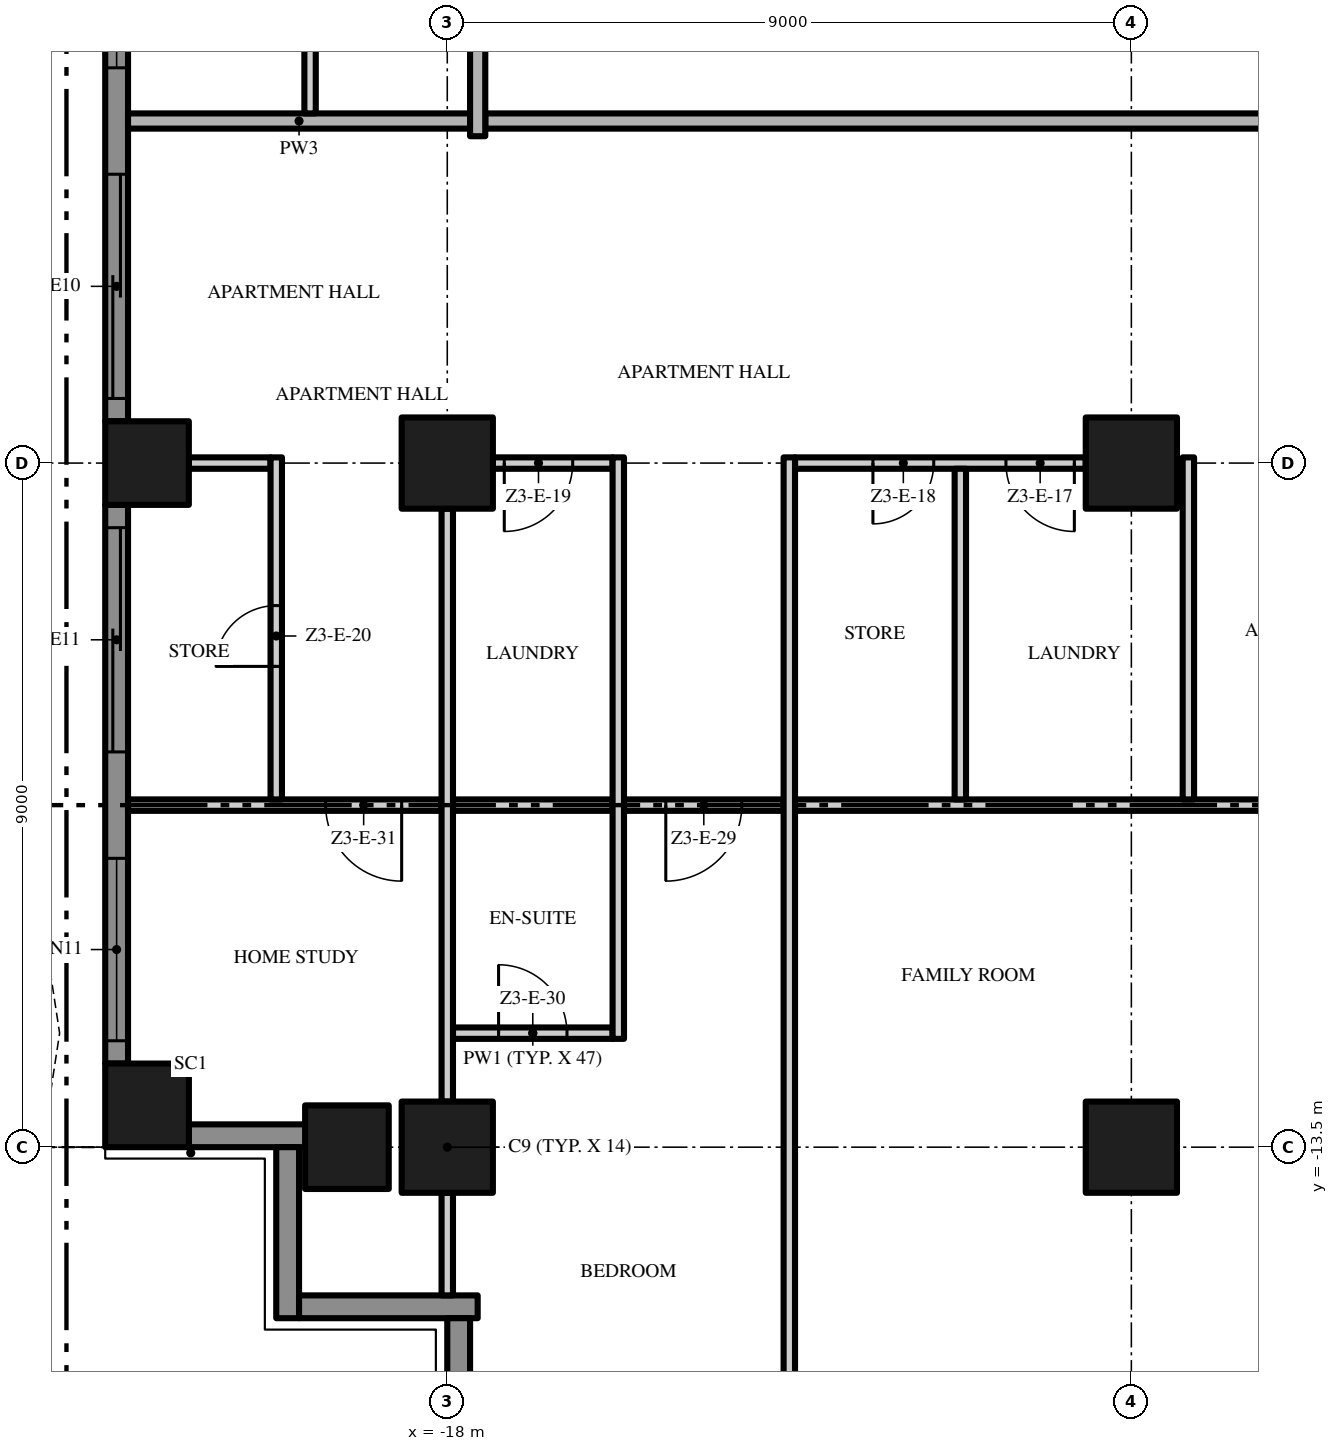
"""IFC4 building model, lengths in metres.
Left out: names, types, materials, properties, quantities, classifications, styles, units other than length and angle.
Written with IfcOpenShell. Run it as: python <this file> out.ifc"""

import sys

from ifc_helpers import new_model, si_unit, direction, frame, frame_2d, origin, origin_2d, place, context, subcontext, project, spatial, polyline, rectangle, outline, extrude, element, fill, save


model = new_model("IFC4")
c1 = context("Model", 3, precision=1e-05, world=origin(), true_north=direction((0.0, 1.0)))
c2 = subcontext(c1, "Body", "Model", "MODEL_VIEW")
j1 = project(units=[si_unit("LENGTHUNIT", "METRE"), si_unit("PLANEANGLEUNIT", "RADIAN")], contexts=[c1])
p1 = place(None, origin())
s1 = spatial("IfcSite", under=j1, at=p1, CompositionType="ELEMENT")
p2 = place(p1, origin())
s2 = spatial("IfcBuilding", under=s1, at=p2, CompositionType="ELEMENT")
p3 = place(p2, frame((0.0, 0.0, 166.8)))
s3 = spatial("IfcBuildingStorey", under=s2, at=p3, CompositionType="ELEMENT", Elevation=166.8)
for number, where, z_axis, x_axis in (
    (1, (-18.0, -13.5, 0.0), (0.0, 0.0, 1.0), (1.0, 0.0, 0.0)),
    (2, (-18.0, -4.5, 0.0), (0.0, 0.0, 1.0), (1.0, 0.0, 0.0)),
):
    element("IfcColumn", number, at=place(p3, frame(where, z_axis=z_axis, x_axis=x_axis)), inside=s3, PredefinedType="COLUMN", context=c2, shape_type="SweptSolid", body=[
        extrude(rectangle(XDim=1.2, YDim=1.2, at=origin_2d()), origin(), (0.0, 0.0, 1.0), 3.5),
    ])
for number, where, z_axis, x_axis in (
    (3, (-21.95, -12.95, 0.0), (0.0, 0.0, 1.0), (1.0, 0.0, 0.0)),
    (4, (-19.32, -13.5, 0.0), (0.0, 0.0, 1.0), (1.0, 0.0, 0.0)),
    (5, (-21.95, -4.5, 0.0), (0.0, 0.0, 1.0), (1.0, 0.0, 0.0)),
):
    element("IfcColumn", number, at=place(p3, frame(where, z_axis=z_axis, x_axis=x_axis)), inside=s3, PredefinedType="COLUMN", context=c2, shape_type="SweptSolid", body=[
        extrude(rectangle(XDim=1.1, YDim=1.1, at=origin_2d()), origin(), (0.0, 0.0, 1.0), 3.5),
    ])
for number, where, z_axis, x_axis in (
    (6, (-9.0, -13.5, 0.0), (0.0, 0.0, 1.0), (1.0, 0.0, 0.0)),
    (7, (-9.0, -4.5, 0.0), (0.0, 0.0, 1.0), (1.0, 0.0, 0.0)),
):
    element("IfcColumn", number, at=place(p3, frame(where, z_axis=z_axis, x_axis=x_axis)), inside=s3, PredefinedType="COLUMN", context=c2, shape_type="SweptSolid", body=[
        extrude(rectangle(XDim=1.2, YDim=1.2, at=origin_2d()), origin(), (0.0, 0.0, 1.0), 3.5),
    ])
p4 = place(p3, frame((-22.35, -3.95, 0.0), z_axis=(0.0, 0.0, 1.0), x_axis=(0.0, 1.0, 0.0)))
e8 = element("IfcWall", 8, at=p4, inside=s3, PredefinedType="SOLIDWALL", context=c2, shape_type="SweptSolid", body=[
    extrude(rectangle(XDim=7.9, YDim=0.3, at=frame_2d((3.95, 0.0))), origin(), (0.0, 0.0, 1.0), 3.5),
])
p5 = place(p4, frame((4.65, 0.0, 0.45)))
e9 = element("IfcOpeningElement", 9, at=p5, cuts=e8, PredefinedType="OPENING", context=c2, shape_type="SweptSolid", body=[
    extrude(rectangle(XDim=2.95, YDim=2.65, at=frame_2d((1.475, 1.325))), frame((0.0, 0.16, 0.0), z_axis=(0.0, -1.0, 0.0), x_axis=(1.0, 0.0, 0.0)), (0.0, 0.0, 1.0), 0.32),
])
p6 = place(p4, frame((0.3, 0.0, 0.0)))
e10 = element("IfcOpeningElement", 10, at=p6, cuts=e8, PredefinedType="OPENING", context=c2, shape_type="SweptSolid", body=[
    extrude(rectangle(XDim=2.95, YDim=2.4, at=frame_2d((1.475, 1.2))), frame((0.0, 0.16, 0.0), z_axis=(0.0, -1.0, 0.0), x_axis=(1.0, 0.0, 0.0)), (0.0, 0.0, 1.0), 0.32),
])
p7 = place(p3, frame((-22.35, -12.4, 0.0), z_axis=(0.0, 0.0, 1.0), x_axis=(0.0, 1.0, 0.0)))
e11 = element("IfcWall", 11, at=p7, inside=s3, PredefinedType="SOLIDWALL", context=c2, shape_type="SweptSolid", body=[
    extrude(rectangle(XDim=7.35, YDim=0.3, at=frame_2d((3.675, 0.0))), origin(), (0.0, 0.0, 1.0), 3.5),
])
p8 = place(p7, frame((4.1, 0.0, 0.0)))
e12 = element("IfcOpeningElement", 12, at=p8, cuts=e11, PredefinedType="OPENING", context=c2, shape_type="SweptSolid", body=[
    extrude(rectangle(XDim=2.95, YDim=2.4, at=frame_2d((1.475, 1.2))), frame((0.0, 0.16, 0.0), z_axis=(0.0, -1.0, 0.0), x_axis=(1.0, 0.0, 0.0)), (0.0, 0.0, 1.0), 0.32),
])
p9 = place(p7, frame((0.3, 0.0, 0.45)))
e13 = element("IfcOpeningElement", 13, at=p9, cuts=e11, PredefinedType="OPENING", context=c2, shape_type="SweptSolid", body=[
    extrude(rectangle(XDim=2.4, YDim=2.65, at=frame_2d((1.2, 1.325))), frame((0.0, 0.16, 0.0), z_axis=(0.0, -1.0, 0.0), x_axis=(1.0, 0.0, 0.0)), (0.0, 0.0, 1.0), 0.32),
])
p10 = place(p3, frame((-19.85, -13.35, 0.0), z_axis=(0.0, 0.0, 1.0), x_axis=(-1.0, 0.0, 0.0)))
e14 = element("IfcWall", 14, at=p10, inside=s3, PredefinedType="SOLIDWALL", context=c2, shape_type="SweptSolid", body=[
    extrude(rectangle(XDim=1.55, YDim=0.3, at=frame_2d((0.775, 0.0))), origin(), (0.0, 0.0, 1.0), 3.5),
])
p11 = place(p3, frame((-20.1, -15.75, 0.0), z_axis=(0.0, 0.0, 1.0), x_axis=(0.0, 1.0, 0.0)))
e15 = element("IfcWall", 15, at=p11, inside=s3, PredefinedType="SOLIDWALL", context=c2, shape_type="SweptSolid", body=[
    extrude(rectangle(XDim=2.25, YDim=0.3, at=frame_2d((1.125, 0.0))), origin(), (0.0, 0.0, 1.0), 3.5),
])
p12 = place(p3, frame((-17.6, -15.6, 0.0), z_axis=(0.0, 0.0, 1.0), x_axis=(-1.0, 0.0, 0.0)))
e16 = element("IfcWall", 16, at=p12, inside=s3, PredefinedType="SOLIDWALL", context=c2, shape_type="SweptSolid", body=[
    extrude(rectangle(XDim=2.35, YDim=0.3, at=frame_2d((1.175, 0.0))), origin(), (0.0, 0.0, 1.0), 3.5),
])
p13 = place(p3, frame((-17.85, -16.9, 0.0), z_axis=(0.0, 0.0, 1.0), x_axis=(0.0, 1.0, 0.0)))
e17 = element("IfcWall", 17, at=p13, inside=s3, PredefinedType="SOLIDWALL", context=c2, shape_type="SweptSolid", body=[
    extrude(rectangle(XDim=1.15, YDim=0.3, at=frame_2d((0.575, 0.0))), origin(), (0.0, 0.0, 1.0), 3.5),
])
p14 = place(p3, origin())
e18 = element("IfcWall", 18, at=p14, inside=s3, PredefinedType="USERDEFINED", context=c2, shape_type="SweptSolid", body=[
    extrude(outline(polyline([(-23.1, 18.0), (-23.329, 16.5), (-23.929, 15.0), (-24.671, 13.5), (-25.271, 12.0), (-25.5, 10.5), (-25.271, 9.0), (-24.671, 7.5), (-23.929, 6.0), (-23.329, 4.5), (-23.1, 3.0), (-23.329, 1.5), (-23.929, 0.0), (-24.671, -1.5), (-25.271, -3.0), (-25.5, -4.5), (-25.271, -6.0), (-24.671, -7.5), (-23.929, -9.0), (-23.329, -10.5), (-23.1, -12.0), (-23.329, -13.5), (-23.082, -13.538), (-22.847, -12.0), (-23.086, -10.434), (-23.701, -8.898), (-24.442, -7.398), (-25.028, -5.934), (-25.247, -4.5), (-25.028, -3.066), (-24.442, -1.602), (-23.701, -0.102), (-23.086, 1.434), (-22.847, 3.0), (-23.086, 4.566), (-23.701, 6.102), (-24.442, 7.602), (-25.028, 9.066), (-25.247, 10.5), (-25.028, 11.934), (-24.442, 13.398), (-23.701, 14.898), (-23.086, 16.434), (-22.853, 17.962), (-23.1, 18.0)])), origin(), (0.0, 0.0, 1.0), 0.9),
])
p15 = place(p3, frame((-17.925, -12.0, 0.0), z_axis=(0.0, 0.0, 1.0), x_axis=(1.0, 0.0, 0.0)))
e19 = element("IfcWall", 19, at=p15, inside=s3, PredefinedType="PARTITIONING", context=c2, shape_type="SweptSolid", body=[
    extrude(rectangle(XDim=2.1, YDim=0.15, at=frame_2d((1.05, 0.0))), origin(), (0.0, 0.0, 1.0), 3.5),
])
p16 = place(p15, frame((0.6, 0.0, 0.0)))
e20 = element("IfcOpeningElement", 20, at=p16, cuts=e19, PredefinedType="OPENING", context=c2, shape_type="SweptSolid", body=[
    extrude(rectangle(XDim=0.9, YDim=2.1, at=frame_2d((0.45, 1.05))), frame((0.0, 0.085, 0.0), z_axis=(0.0, -1.0, 0.0), x_axis=(1.0, 0.0, 0.0)), (0.0, 0.0, 1.0), 0.17),
])
p17 = place(p3, frame((-18.075, -9.0, 0.0), z_axis=(0.0, 0.0, 1.0), x_axis=(-1.0, 0.0, 0.0)))
e21 = element("IfcWall", 21, at=p17, inside=s3, PredefinedType="PARTITIONING", context=c2, shape_type="SweptSolid", body=[
    extrude(rectangle(XDim=4.125, YDim=0.15, at=frame_2d((2.062, 0.0))), origin(), (0.0, 0.0, 1.0), 3.5),
])
p18 = place(p17, frame((0.525, 0.0, 0.0)))
e22 = element("IfcOpeningElement", 22, at=p18, cuts=e21, PredefinedType="OPENING", context=c2, shape_type="SweptSolid", body=[
    extrude(rectangle(XDim=1.0, YDim=2.4, at=frame_2d((0.5, 1.2))), frame((0.0, 0.085, 0.0), z_axis=(0.0, -1.0, 0.0), x_axis=(1.0, 0.0, 0.0)), (0.0, 0.0, 1.0), 0.17),
])
p19 = place(p3, frame((-17.925, -9.0, 0.0), z_axis=(0.0, 0.0, 1.0), x_axis=(1.0, 0.0, 0.0)))
e23 = element("IfcWall", 23, at=p19, inside=s3, PredefinedType="PARTITIONING", context=c2, shape_type="SweptSolid", body=[
    extrude(rectangle(XDim=2.1, YDim=0.15, at=frame_2d((1.05, 0.0))), origin(), (0.0, 0.0, 1.0), 3.5),
])
p20 = place(p3, frame((-13.575, -9.0, 0.0), z_axis=(0.0, 0.0, 1.0), x_axis=(-1.0, 0.0, 0.0)))
e24 = element("IfcWall", 24, at=p20, inside=s3, PredefinedType="PARTITIONING", context=c2, shape_type="SweptSolid", body=[
    extrude(rectangle(XDim=2.1, YDim=0.15, at=frame_2d((1.05, 0.0))), origin(), (0.0, 0.0, 1.0), 3.5),
])
p21 = place(p20, frame((0.55, 0.0, 0.0)))
e25 = element("IfcOpeningElement", 25, at=p21, cuts=e24, PredefinedType="OPENING", context=c2, shape_type="SweptSolid", body=[
    extrude(rectangle(XDim=1.0, YDim=2.4, at=frame_2d((0.5, 1.2))), frame((0.0, 0.085, 0.0), z_axis=(0.0, -1.0, 0.0), x_axis=(1.0, 0.0, 0.0)), (0.0, 0.0, 1.0), 0.17),
])
p22 = place(p3, frame((-4.575, -9.0, 0.0), z_axis=(0.0, 0.0, 1.0), x_axis=(-1.0, 0.0, 0.0)))
e26 = element("IfcWall", 26, at=p22, inside=s3, PredefinedType="PARTITIONING", context=c2, shape_type="SweptSolid", body=[
    extrude(rectangle(XDim=8.85, YDim=0.15, at=frame_2d((4.425, 0.0))), origin(), (0.0, 0.0, 1.0), 3.5),
])
p23 = place(p22, frame((1.075, 0.0, 0.0)))
e27 = element("IfcOpeningElement", 27, at=p23, cuts=e26, PredefinedType="OPENING", context=c2, shape_type="SweptSolid", body=[
    extrude(rectangle(XDim=1.5, YDim=2.4, at=frame_2d((0.75, 1.2))), frame((0.0, 0.085, 0.0), z_axis=(0.0, -1.0, 0.0), x_axis=(1.0, 0.0, 0.0)), (0.0, 0.0, 1.0), 0.17),
])
p24 = place(p3, frame((-21.4, -4.5, 0.0), z_axis=(0.0, 0.0, 1.0), x_axis=(1.0, 0.0, 0.0)))
e28 = element("IfcWall", 28, at=p24, inside=s3, PredefinedType="PARTITIONING", context=c2, shape_type="SweptSolid", body=[
    extrude(rectangle(XDim=1.075, YDim=0.15, at=frame_2d((0.537, 0.0))), origin(), (0.0, 0.0, 1.0), 3.5),
])
p25 = place(p3, frame((-15.825, -4.5, 0.0), z_axis=(0.0, 0.0, 1.0), x_axis=(-1.0, 0.0, 0.0)))
e29 = element("IfcWall", 29, at=p25, inside=s3, PredefinedType="PARTITIONING", context=c2, shape_type="SweptSolid", body=[
    extrude(rectangle(XDim=1.575, YDim=0.15, at=frame_2d((0.787, 0.0))), origin(), (0.0, 0.0, 1.0), 3.5),
])
p26 = place(p25, frame((0.525, 0.0, 0.0)))
e30 = element("IfcOpeningElement", 30, at=p26, cuts=e29, PredefinedType="OPENING", context=c2, shape_type="SweptSolid", body=[
    extrude(rectangle(XDim=0.9, YDim=2.1, at=frame_2d((0.45, 1.05))), frame((0.0, 0.085, 0.0), z_axis=(0.0, -1.0, 0.0), x_axis=(1.0, 0.0, 0.0)), (0.0, 0.0, 1.0), 0.17),
])
p27 = place(p3, frame((-9.6, -4.5, 0.0), z_axis=(0.0, 0.0, 1.0), x_axis=(-1.0, 0.0, 0.0)))
e31 = element("IfcWall", 31, at=p27, inside=s3, PredefinedType="PARTITIONING", context=c2, shape_type="SweptSolid", body=[
    extrude(rectangle(XDim=3.825, YDim=0.15, at=frame_2d((1.913, 0.0))), origin(), (0.0, 0.0, 1.0), 3.5),
])
p28 = place(p27, frame((0.15, 0.0, 0.0)))
e32 = element("IfcOpeningElement", 32, at=p28, cuts=e31, PredefinedType="OPENING", context=c2, shape_type="SweptSolid", body=[
    extrude(rectangle(XDim=0.9, YDim=2.1, at=frame_2d((0.45, 1.05))), frame((0.0, 0.085, 0.0), z_axis=(0.0, -1.0, 0.0), x_axis=(1.0, 0.0, 0.0)), (0.0, 0.0, 1.0), 0.17),
])
p29 = place(p27, frame((2.0, 0.0, 0.0)))
e33 = element("IfcOpeningElement", 33, at=p29, cuts=e31, PredefinedType="OPENING", context=c2, shape_type="SweptSolid", body=[
    extrude(rectangle(XDim=0.8, YDim=2.0, at=frame_2d((0.4, 1.0))), frame((0.0, 0.085, 0.0), z_axis=(0.0, -1.0, 0.0), x_axis=(1.0, 0.0, 0.0)), (0.0, 0.0, 1.0), 0.17),
])
p30 = place(p3, frame((17.5, 0.0, 0.0), z_axis=(0.0, 0.0, 1.0), x_axis=(-1.0, 0.0, 0.0)))
e34 = element("IfcWall", 34, at=p30, inside=s3, PredefinedType="PARTITIONING", context=c2, shape_type="SweptSolid", body=[
    extrude(rectangle(XDim=35.0, YDim=0.2, at=frame_2d((17.5, 0.0))), origin(), (0.0, 0.0, 1.0), 3.5),
])
p31 = place(p30, frame((16.75, 0.0, 0.0)))
e35 = element("IfcOpeningElement", 35, at=p31, cuts=e34, PredefinedType="OPENING", context=c2, shape_type="SweptSolid", body=[
    extrude(rectangle(XDim=1.5, YDim=2.4, at=frame_2d((0.75, 1.2))), frame((0.0, 0.11, 0.0), z_axis=(0.0, -1.0, 0.0), x_axis=(1.0, 0.0, 0.0)), (0.0, 0.0, 1.0), 0.22),
])
p32 = place(p3, frame((-22.2, 0.0, 0.0), z_axis=(0.0, 0.0, 1.0), x_axis=(1.0, 0.0, 0.0)))
e36 = element("IfcWall", 36, at=p32, inside=s3, PredefinedType="PARTITIONING", context=c2, shape_type="SweptSolid", body=[
    extrude(rectangle(XDim=4.5, YDim=0.2, at=frame_2d((2.25, 0.0))), origin(), (0.0, 0.0, 1.0), 3.5),
])
p33 = place(p3, frame((-20.25, -8.925, 0.0), z_axis=(0.0, 0.0, 1.0), x_axis=(0.0, 1.0, 0.0)))
e37 = element("IfcWall", 37, at=p33, inside=s3, PredefinedType="PARTITIONING", context=c2, shape_type="SweptSolid", body=[
    extrude(rectangle(XDim=4.5, YDim=0.15, at=frame_2d((2.25, 0.0))), origin(), (0.0, 0.0, 1.0), 3.5),
])
p34 = place(p33, frame((1.75, 0.0, 0.0)))
e38 = element("IfcOpeningElement", 38, at=p34, cuts=e37, PredefinedType="OPENING", context=c2, shape_type="SweptSolid", body=[
    extrude(rectangle(XDim=0.8, YDim=2.0, at=frame_2d((0.4, 1.0))), frame((0.0, 0.085, 0.0), z_axis=(0.0, -1.0, 0.0), x_axis=(1.0, 0.0, 0.0)), (0.0, 0.0, 1.0), 0.17),
])
p35 = place(p3, frame((-19.805, 0.1, 0.0), z_axis=(0.0, 0.0, 1.0), x_axis=(0.0, 1.0, 0.0)))
e39 = element("IfcWall", 39, at=p35, inside=s3, PredefinedType="PARTITIONING", context=c2, shape_type="SweptSolid", body=[
    extrude(rectangle(XDim=2.225, YDim=0.15, at=frame_2d((1.113, 0.0))), origin(), (0.0, 0.0, 1.0), 3.5),
])
p36 = place(p3, frame((-18.0, -15.45, 0.0), z_axis=(0.0, 0.0, 1.0), x_axis=(0.0, 1.0, 0.0)))
e40 = element("IfcWall", 40, at=p36, inside=s3, PredefinedType="PARTITIONING", context=c2, shape_type="SweptSolid", body=[
    extrude(rectangle(XDim=1.35, YDim=0.15, at=frame_2d((0.675, 0.0))), origin(), (0.0, 0.0, 1.0), 3.5),
])
p37 = place(p3, frame((-18.0, -12.9, 0.0), z_axis=(0.0, 0.0, 1.0), x_axis=(0.0, 1.0, 0.0)))
e41 = element("IfcWall", 41, at=p37, inside=s3, PredefinedType="PARTITIONING", context=c2, shape_type="SweptSolid", body=[
    extrude(rectangle(XDim=7.8, YDim=0.15, at=frame_2d((3.9, 0.0))), origin(), (0.0, 0.0, 1.0), 3.5),
])
p38 = place(p3, frame((-17.6, -0.2, 0.0), z_axis=(0.0, 0.0, 1.0), x_axis=(0.0, 1.0, 0.0)))
e42 = element("IfcWall", 42, at=p38, inside=s3, PredefinedType="PARTITIONING", context=c2, shape_type="SweptSolid", body=[
    extrude(rectangle(XDim=4.1, YDim=0.2, at=frame_2d((2.05, 0.0))), origin(), (0.0, 0.0, 1.0), 3.5),
])
p39 = place(p3, frame((-15.75, -12.075, 0.0), z_axis=(0.0, 0.0, 1.0), x_axis=(0.0, 1.0, 0.0)))
e43 = element("IfcWall", 43, at=p39, inside=s3, PredefinedType="PARTITIONING", context=c2, shape_type="SweptSolid", body=[
    extrude(rectangle(XDim=7.65, YDim=0.15, at=frame_2d((3.825, 0.0))), origin(), (0.0, 0.0, 1.0), 3.5),
])
p40 = place(p3, frame((-13.5, -17.7, 0.0), z_axis=(0.0, 0.0, 1.0), x_axis=(0.0, 1.0, 0.0)))
e44 = element("IfcWall", 44, at=p40, inside=s3, PredefinedType="PARTITIONING", context=c2, shape_type="SweptSolid", body=[
    extrude(rectangle(XDim=13.275, YDim=0.15, at=frame_2d((6.638, 0.0))), origin(), (0.0, 0.0, 1.0), 3.5),
])
p41 = place(p3, frame((-11.25, -8.925, 0.0), z_axis=(0.0, 0.0, 1.0), x_axis=(0.0, 1.0, 0.0)))
e45 = element("IfcWall", 45, at=p41, inside=s3, PredefinedType="PARTITIONING", context=c2, shape_type="SweptSolid", body=[
    extrude(rectangle(XDim=4.35, YDim=0.15, at=frame_2d((2.175, 0.0))), origin(), (0.0, 0.0, 1.0), 3.5),
])
p42 = place(p3, frame((-8.25, -8.925, 0.0), z_axis=(0.0, 0.0, 1.0), x_axis=(0.0, 1.0, 0.0)))
e46 = element("IfcWall", 46, at=p42, inside=s3, PredefinedType="PARTITIONING", context=c2, shape_type="SweptSolid", body=[
    extrude(rectangle(XDim=4.5, YDim=0.15, at=frame_2d((2.25, 0.0))), origin(), (0.0, 0.0, 1.0), 3.5),
])
p43 = place(p5, origin())
e47 = element("IfcWindow", 47, at=p43, inside=s3, PartitioningType="SINGLE_PANEL", PredefinedType="WINDOW", context=c2, shape_type="SweptSolid", body=[
    extrude(rectangle(XDim=2.95, YDim=2.65, at=frame_2d((1.475, 1.325))), frame((0.0, 0.03, 0.0), z_axis=(0.0, -1.0, 0.0), x_axis=(1.0, 0.0, 0.0)), (0.0, 0.0, 1.0), 0.06),
])
fill(e9, e47)
p44 = place(p6, origin())
e48 = element("IfcDoor", 48, at=p44, inside=s3, OperationType="SINGLE_SWING_LEFT", PredefinedType="DOOR", context=c2, shape_type="SweptSolid", body=[
    extrude(rectangle(XDim=2.95, YDim=2.4, at=frame_2d((1.475, 1.2))), frame((0.0, 0.025, 0.0), z_axis=(0.0, -1.0, 0.0), x_axis=(1.0, 0.0, 0.0)), (0.0, 0.0, 1.0), 0.05),
])
fill(e10, e48)
p45 = place(p8, origin())
e49 = element("IfcDoor", 49, at=p45, inside=s3, OperationType="SINGLE_SWING_LEFT", PredefinedType="DOOR", context=c2, shape_type="SweptSolid", body=[
    extrude(rectangle(XDim=2.95, YDim=2.4, at=frame_2d((1.475, 1.2))), frame((0.0, 0.025, 0.0), z_axis=(0.0, -1.0, 0.0), x_axis=(1.0, 0.0, 0.0)), (0.0, 0.0, 1.0), 0.05),
])
fill(e12, e49)
p46 = place(p9, origin())
e50 = element("IfcWindow", 50, at=p46, inside=s3, PartitioningType="SINGLE_PANEL", PredefinedType="WINDOW", context=c2, shape_type="SweptSolid", body=[
    extrude(rectangle(XDim=2.4, YDim=2.65, at=frame_2d((1.2, 1.325))), frame((0.0, 0.03, 0.0), z_axis=(0.0, -1.0, 0.0), x_axis=(1.0, 0.0, 0.0)), (0.0, 0.0, 1.0), 0.06),
])
fill(e13, e50)
p47 = place(p28, origin())
e51 = element("IfcDoor", 51, at=p47, inside=s3, OperationType="SINGLE_SWING_LEFT", PredefinedType="DOOR", context=c2, shape_type="SweptSolid", body=[
    extrude(rectangle(XDim=0.9, YDim=2.1, at=frame_2d((0.45, 1.05))), frame((0.0, 0.025, 0.0), z_axis=(0.0, -1.0, 0.0), x_axis=(1.0, 0.0, 0.0)), (0.0, 0.0, 1.0), 0.05),
])
fill(e32, e51)
p48 = place(p29, origin())
e52 = element("IfcDoor", 52, at=p48, inside=s3, OperationType="SINGLE_SWING_RIGHT", PredefinedType="DOOR", context=c2, shape_type="SweptSolid", body=[
    extrude(rectangle(XDim=0.8, YDim=2.0, at=frame_2d((0.4, 1.0))), frame((0.0, 0.025, 0.0), z_axis=(0.0, -1.0, 0.0), x_axis=(1.0, 0.0, 0.0)), (0.0, 0.0, 1.0), 0.05),
])
fill(e33, e52)
p49 = place(p26, origin())
e53 = element("IfcDoor", 53, at=p49, inside=s3, OperationType="SINGLE_SWING_RIGHT", PredefinedType="DOOR", context=c2, shape_type="SweptSolid", body=[
    extrude(rectangle(XDim=0.9, YDim=2.1, at=frame_2d((0.45, 1.05))), frame((0.0, 0.025, 0.0), z_axis=(0.0, -1.0, 0.0), x_axis=(1.0, 0.0, 0.0)), (0.0, 0.0, 1.0), 0.05),
])
fill(e30, e53)
p50 = place(p34, origin())
e54 = element("IfcDoor", 54, at=p50, inside=s3, OperationType="SINGLE_SWING_LEFT", PredefinedType="DOOR", context=c2, shape_type="SweptSolid", body=[
    extrude(rectangle(XDim=0.8, YDim=2.0, at=frame_2d((0.4, 1.0))), frame((0.0, 0.025, 0.0), z_axis=(0.0, -1.0, 0.0), x_axis=(1.0, 0.0, 0.0)), (0.0, 0.0, 1.0), 0.05),
])
fill(e38, e54)
p51 = place(p21, origin())
e55 = element("IfcDoor", 55, at=p51, inside=s3, OperationType="SINGLE_SWING_RIGHT", PredefinedType="DOOR", context=c2, shape_type="SweptSolid", body=[
    extrude(rectangle(XDim=1.0, YDim=2.4, at=frame_2d((0.5, 1.2))), frame((0.0, 0.025, 0.0), z_axis=(0.0, -1.0, 0.0), x_axis=(1.0, 0.0, 0.0)), (0.0, 0.0, 1.0), 0.05),
])
fill(e25, e55)
p52 = place(p16, origin())
e56 = element("IfcDoor", 56, at=p52, inside=s3, OperationType="SINGLE_SWING_LEFT", PredefinedType="DOOR", context=c2, shape_type="SweptSolid", body=[
    extrude(rectangle(XDim=0.9, YDim=2.1, at=frame_2d((0.45, 1.05))), frame((0.0, 0.025, 0.0), z_axis=(0.0, -1.0, 0.0), x_axis=(1.0, 0.0, 0.0)), (0.0, 0.0, 1.0), 0.05),
])
fill(e20, e56)
p53 = place(p18, origin())
e57 = element("IfcDoor", 57, at=p53, inside=s3, OperationType="SINGLE_SWING_LEFT", PredefinedType="DOOR", context=c2, shape_type="SweptSolid", body=[
    extrude(rectangle(XDim=1.0, YDim=2.4, at=frame_2d((0.5, 1.2))), frame((0.0, 0.025, 0.0), z_axis=(0.0, -1.0, 0.0), x_axis=(1.0, 0.0, 0.0)), (0.0, 0.0, 1.0), 0.05),
])
fill(e22, e57)
save(model, sys.argv[1])
